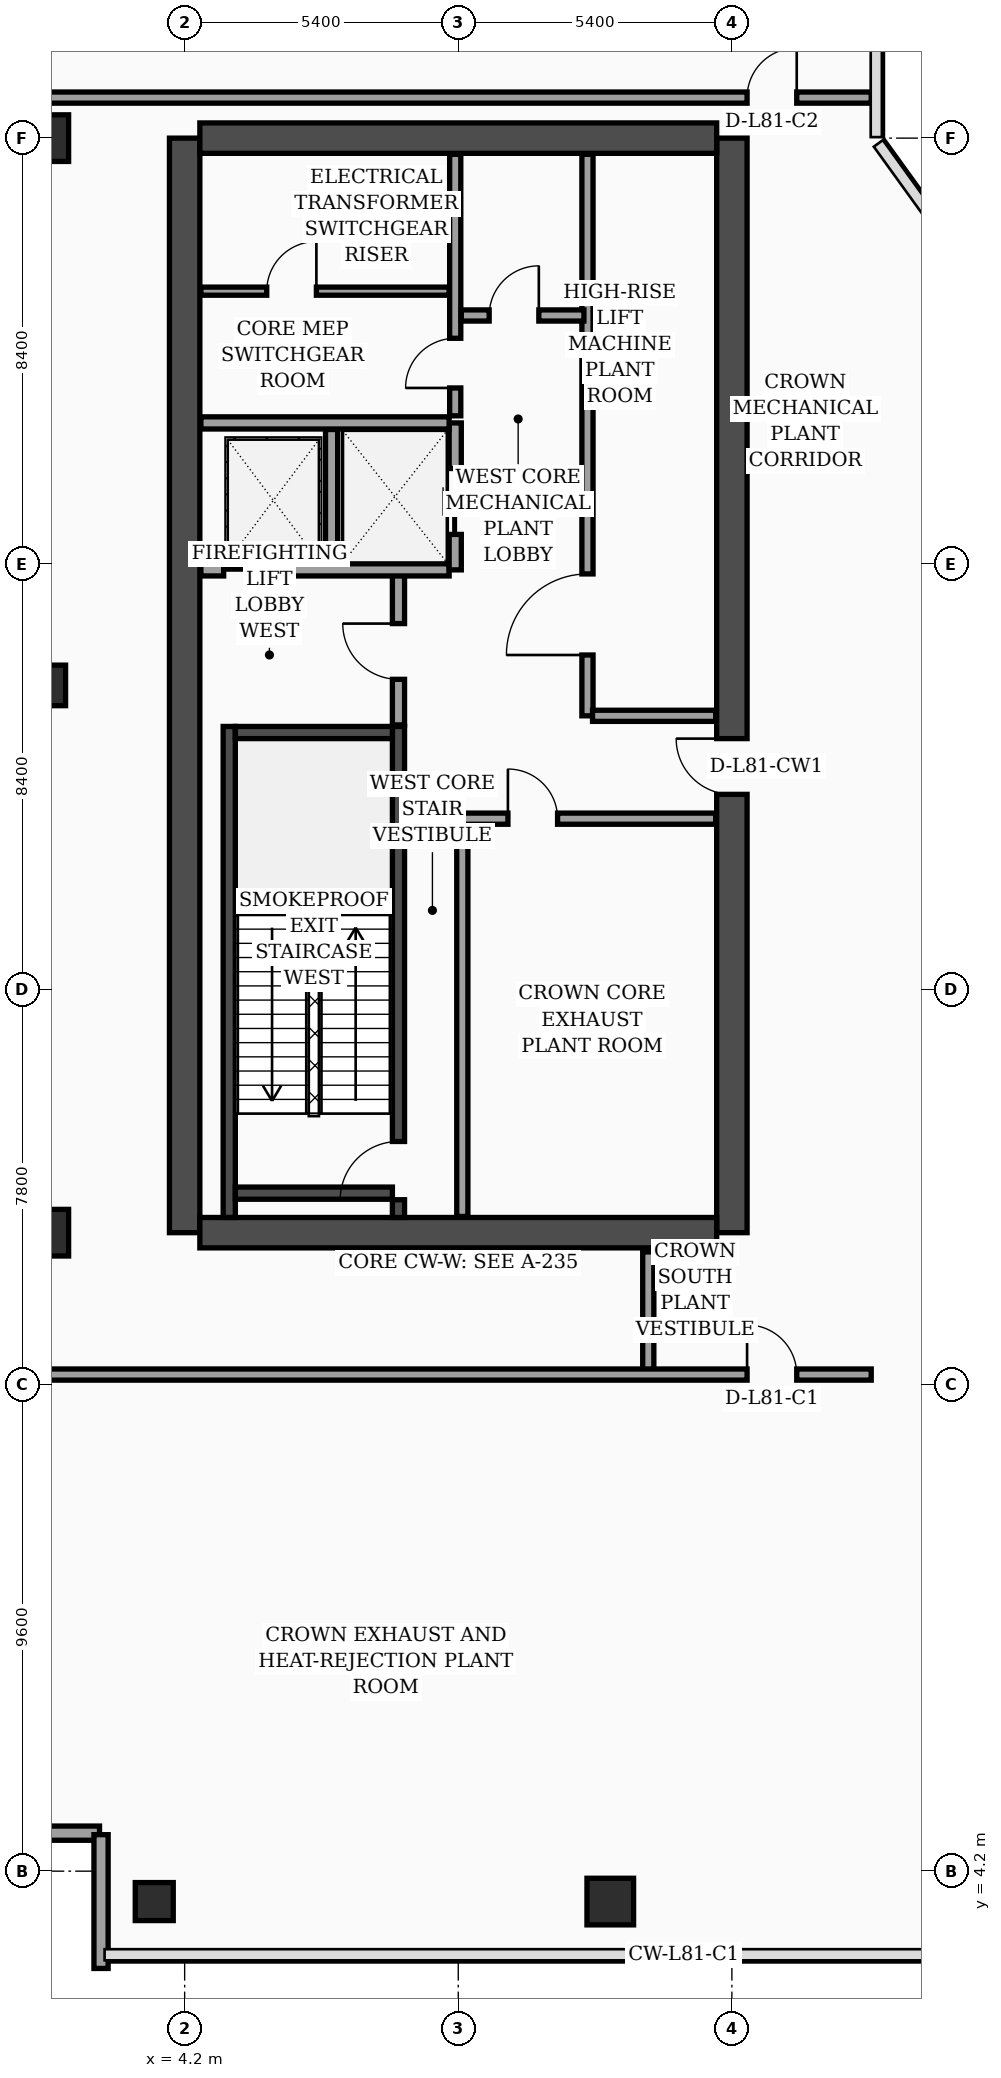
"""IFC4 building model, lengths in metres.
Left out: names, types, materials, properties, quantities, classifications, styles, units other than length and angle.
Written with IfcOpenShell. Run it as: python <this file> out.ifc"""

import sys

from ifc_helpers import new_model, si_unit, direction, frame, frame_2d, origin, origin_2d, place, context, subcontext, project, spatial, rectangle, hollow_rectangle, extrude, element, fill, save


model = new_model("IFC4")
c1 = context("Model", 3, precision=1e-05, world=origin(), true_north=direction((0.0, 1.0)))
c2 = subcontext(c1, "Body", "Model", "MODEL_VIEW")
j1 = project(units=[si_unit("LENGTHUNIT", "METRE"), si_unit("PLANEANGLEUNIT", "RADIAN")], contexts=[c1])
p1 = place(None, origin())
s1 = spatial("IfcSite", under=j1, at=p1, CompositionType="ELEMENT")
p2 = place(p1, origin())
s2 = spatial("IfcBuilding", under=s1, at=p2, CompositionType="ELEMENT")
p3 = place(p2, frame((0.0, 0.0, 330.5)))
s3 = spatial("IfcBuildingStorey", under=s2, at=p3, CompositionType="ELEMENT", Elevation=330.5)
p4 = place(p3, frame((4.2, 16.8, 0.0), z_axis=(0.0, 0.0, 1.0), x_axis=(0.0, 1.0, 0.0)))
e1 = element("IfcWall", 1, at=p4, inside=s3, PredefinedType="SHEAR", context=c2, shape_type="SweptSolid", body=[
    extrude(rectangle(XDim=21.6, YDim=0.6, at=frame_2d((10.8, 0.0))), origin(), (0.0, 0.0, 1.0), 4.76),
])
p5 = place(p3, frame((15.0, 16.8, 0.0), z_axis=(0.0, 0.0, 1.0), x_axis=(0.0, 1.0, 0.0)))
e2 = element("IfcWall", 2, at=p5, inside=s3, PredefinedType="SHEAR", context=c2, shape_type="SweptSolid", body=[
    extrude(rectangle(XDim=21.6, YDim=0.6, at=frame_2d((10.8, 0.0))), origin(), (0.0, 0.0, 1.0), 4.76),
])
p6 = place(p5, frame((8.65, 0.0, 0.0)))
e3 = element("IfcOpeningElement", 3, at=p6, cuts=e2, PredefinedType="OPENING", context=c2, shape_type="SweptSolid", body=[
    extrude(rectangle(XDim=1.1, YDim=2.2, at=frame_2d((0.55, 1.1))), frame((0.0, 0.31, 0.0), z_axis=(0.0, -1.0, 0.0), x_axis=(1.0, 0.0, 0.0)), (0.0, 0.0, 1.0), 0.62),
])
for number, where, z_axis, x_axis in (
    (4, (4.5, 38.4, 0.0), (0.0, 0.0, 1.0), (1.0, 0.0, 0.0)),
    (5, (4.5, 16.8, 0.0), (0.0, 0.0, 1.0), (1.0, 0.0, 0.0)),
):
    element("IfcWall", number, at=place(p3, frame(where, z_axis=z_axis, x_axis=x_axis)), inside=s3, PredefinedType="SHEAR", context=c2, shape_type="SweptSolid", body=[
        extrude(rectangle(XDim=10.2, YDim=0.6, at=frame_2d((5.1, 0.0))), origin(), (0.0, 0.0, 1.0), 4.76),
    ])
p7 = place(p3, frame((5.08, 17.1, 0.0), z_axis=(0.0, 0.0, 1.0), x_axis=(0.0, 1.0, 0.0)))
e6 = element("IfcWall", 6, at=p7, inside=s3, PredefinedType="SOLIDWALL", context=c2, shape_type="SweptSolid", body=[
    extrude(rectangle(XDim=9.69, YDim=0.24, at=frame_2d((4.845, 0.0))), origin(), (0.0, 0.0, 1.0), 4.76),
])
p8 = place(p3, frame((8.42, 17.1, 0.0), z_axis=(0.0, 0.0, 1.0), x_axis=(0.0, 1.0, 0.0)))
e7 = element("IfcWall", 7, at=p8, inside=s3, PredefinedType="SOLIDWALL", context=c2, shape_type="SweptSolid", body=[
    extrude(rectangle(XDim=9.69, YDim=0.24, at=frame_2d((4.845, 0.0))), origin(), (0.0, 0.0, 1.0), 4.76),
])
p9 = place(p8, frame((0.35, 0.0, 0.0)))
e8 = element("IfcOpeningElement", 8, at=p9, cuts=e7, PredefinedType="OPENING", context=c2, shape_type="SweptSolid", body=[
    extrude(rectangle(XDim=1.15, YDim=2.2, at=frame_2d((0.575, 1.1))), frame((0.0, 0.13, 0.0), z_axis=(0.0, -1.0, 0.0), x_axis=(1.0, 0.0, 0.0)), (0.0, 0.0, 1.0), 0.26),
])
for number, where, z_axis, x_axis in (
    (9, (5.2, 17.58, 0.0), (0.0, 0.0, 1.0), (1.0, 0.0, 0.0)),
    (10, (5.2, 26.67, 0.0), (0.0, 0.0, 1.0), (1.0, 0.0, 0.0)),
):
    element("IfcWall", number, at=place(p3, frame(where, z_axis=z_axis, x_axis=x_axis)), inside=s3, PredefinedType="SOLIDWALL", context=c2, shape_type="SweptSolid", body=[
        extrude(rectangle(XDim=3.1, YDim=0.24, at=frame_2d((1.55, 0.0))), origin(), (0.0, 0.0, 1.0), 4.76),
    ])
p10 = place(p3, frame((3.6, 3.6, 0.0), z_axis=(0.0, 0.0, 1.0), x_axis=(1.0, 0.0, 0.0)))
e11 = element("IfcColumn", 11, at=p10, inside=s3, PredefinedType="COLUMN", context=c2, shape_type="SweptSolid", body=[
    extrude(hollow_rectangle(XDim=0.75, YDim=0.75, WallThickness=0.032, at=origin_2d()), origin(), (0.0, 0.0, 1.0), 4.76),
])
p11 = place(p3, frame((1.45, 16.8, 0.0), z_axis=(0.0, 0.0, 1.0), x_axis=(1.0, 0.0, 0.0)))
e12 = element("IfcColumn", 12, at=p11, inside=s3, PredefinedType="COLUMN", context=c2, shape_type="SweptSolid", body=[
    extrude(rectangle(XDim=0.92, YDim=0.92, at=origin_2d()), origin(), (0.0, 0.0, 1.0), 4.76),
])
p12 = place(p3, frame((1.45, 27.6, 0.0), z_axis=(0.0, 0.0, 1.0), x_axis=(1.0, 0.0, 0.0)))
e13 = element("IfcColumn", 13, at=p12, inside=s3, PredefinedType="COLUMN", context=c2, shape_type="SweptSolid", body=[
    extrude(rectangle(XDim=0.8, YDim=0.8, at=origin_2d()), origin(), (0.0, 0.0, 1.0), 4.76),
])
for number, where, z_axis, x_axis in (
    (14, (1.45, 38.4, 0.0), (0.0, 0.0, 1.0), (1.0, 0.0, 0.0)),
    (15, (12.6, 3.6, 0.0), (0.0, 0.0, 1.0), (1.0, 0.0, 0.0)),
):
    element("IfcColumn", number, at=place(p3, frame(where, z_axis=z_axis, x_axis=x_axis)), inside=s3, PredefinedType="COLUMN", context=c2, shape_type="SweptSolid", body=[
        extrude(rectangle(XDim=0.92, YDim=0.92, at=origin_2d()), origin(), (0.0, 0.0, 1.0), 4.76),
    ])
p13 = place(p3, frame((-0.12, 4.95, 0.0), z_axis=(0.0, 0.0, 1.0), x_axis=(1.0, 0.0, 0.0)))
e16 = element("IfcWall", 16, at=p13, inside=s3, PredefinedType="SOLIDWALL", context=c2, shape_type="SweptSolid", body=[
    extrude(rectangle(XDim=2.64, YDim=0.28, at=frame_2d((1.32, 0.0))), origin(), (0.0, 0.0, 1.0), 4.76),
])
p14 = place(p3, frame((2.55, 4.92, 0.0), z_axis=(0.0, 0.0, 1.0), x_axis=(0.0, -1.0, 0.0)))
e17 = element("IfcWall", 17, at=p14, inside=s3, PredefinedType="SOLIDWALL", context=c2, shape_type="SweptSolid", body=[
    extrude(rectangle(XDim=2.64, YDim=0.28, at=frame_2d((1.32, 0.0))), origin(), (0.0, 0.0, 1.0), 4.76),
])
p15 = place(p3, frame((8.42, 26.82, 0.0), z_axis=(0.0, 0.0, 1.0), x_axis=(0.0, 1.0, 0.0)))
e18 = element("IfcWall", 18, at=p15, inside=s3, PredefinedType="SOLIDWALL", context=c2, shape_type="SweptSolid", body=[
    extrude(rectangle(XDim=3.0, YDim=0.24, at=frame_2d((1.5, 0.0))), origin(), (0.0, 0.0, 1.0), 4.76),
])
p16 = place(p15, frame((0.9, 0.0, 0.0)))
e19 = element("IfcOpeningElement", 19, at=p16, cuts=e18, PredefinedType="OPENING", context=c2, shape_type="SweptSolid", body=[
    extrude(rectangle(XDim=1.1, YDim=2.2, at=frame_2d((0.55, 1.1))), frame((0.0, 0.13, 0.0), z_axis=(0.0, -1.0, 0.0), x_axis=(1.0, 0.0, 0.0)), (0.0, 0.0, 1.0), 0.26),
])
p17 = place(p3, frame((4.52, 29.88, 0.0), z_axis=(0.0, 0.0, 1.0), x_axis=(1.0, 0.0, 0.0)))
e20 = element("IfcWall", 20, at=p17, inside=s3, PredefinedType="SOLIDWALL", context=c2, shape_type="SweptSolid", body=[
    extrude(rectangle(XDim=4.9, YDim=0.24, at=frame_2d((2.45, 0.0))), origin(), (0.0, 0.0, 1.0), 4.76),
])
p18 = place(p17, frame((0.45, 0.0, 0.0)))
e21 = element("IfcOpeningElement", 21, at=p18, cuts=e20, PredefinedType="OPENING", context=c2, shape_type="SweptSolid", body=[
    extrude(rectangle(XDim=1.3, YDim=2.35, at=frame_2d((0.65, 1.175))), frame((0.0, 0.13, 0.0), z_axis=(0.0, -1.0, 0.0), x_axis=(1.0, 0.0, 0.0)), (0.0, 0.0, 1.0), 0.26),
])
p19 = place(p3, frame((7.1, 30.02, 0.0), z_axis=(0.0, 0.0, 1.0), x_axis=(0.0, 1.0, 0.0)))
e22 = element("IfcWall", 22, at=p19, inside=s3, PredefinedType="SOLIDWALL", context=c2, shape_type="SweptSolid", body=[
    extrude(rectangle(XDim=2.63, YDim=0.24, at=frame_2d((1.315, 0.0))), origin(), (0.0, 0.0, 1.0), 4.76),
])
p20 = place(p3, frame((9.54, 29.88, 0.0), z_axis=(0.0, 0.0, 1.0), x_axis=(0.0, 1.0, 0.0)))
e23 = element("IfcWall", 23, at=p20, inside=s3, PredefinedType="SOLIDWALL", context=c2, shape_type="SweptSolid", body=[
    extrude(rectangle(XDim=2.9, YDim=0.24, at=frame_2d((1.45, 0.0))), origin(), (0.0, 0.0, 1.0), 4.76),
])
p21 = place(p20, frame((0.7, 0.0, 0.0)))
e24 = element("IfcOpeningElement", 24, at=p21, cuts=e23, PredefinedType="OPENING", context=c2, shape_type="SweptSolid", body=[
    extrude(rectangle(XDim=1.3, YDim=2.35, at=frame_2d((0.65, 1.175))), frame((0.0, 0.13, 0.0), z_axis=(0.0, -1.0, 0.0), x_axis=(1.0, 0.0, 0.0)), (0.0, 0.0, 1.0), 0.26),
])
p22 = place(p3, frame((4.52, 32.78, 0.0), z_axis=(0.0, 0.0, 1.0), x_axis=(1.0, 0.0, 0.0)))
e25 = element("IfcWall", 25, at=p22, inside=s3, PredefinedType="SOLIDWALL", context=c2, shape_type="SweptSolid", body=[
    extrude(rectangle(XDim=4.9, YDim=0.24, at=frame_2d((2.45, 0.0))), origin(), (0.0, 0.0, 1.0), 4.76),
])
p23 = place(p3, frame((9.68, 17.12, 0.0), z_axis=(0.0, 0.0, 1.0), x_axis=(0.0, 1.0, 0.0)))
e26 = element("IfcWall", 26, at=p23, inside=s3, PredefinedType="SOLIDWALL", context=c2, shape_type="SweptSolid", body=[
    extrude(rectangle(XDim=7.88, YDim=0.22, at=frame_2d((3.94, 0.0))), origin(), (0.0, 0.0, 1.0), 4.76),
])
p24 = place(p3, frame((4.52, 35.38, 0.0), z_axis=(0.0, 0.0, 1.0), x_axis=(1.0, 0.0, 0.0)))
e27 = element("IfcWall", 27, at=p24, inside=s3, PredefinedType="PARTITIONING", context=c2, shape_type="SweptSolid", body=[
    extrude(rectangle(XDim=4.9, YDim=0.16, at=frame_2d((2.45, 0.0))), origin(), (0.0, 0.0, 1.0), 4.76),
])
p25 = place(p24, frame((1.3, 0.0, 0.0)))
e28 = element("IfcOpeningElement", 28, at=p25, cuts=e27, PredefinedType="OPENING", context=c2, shape_type="SweptSolid", body=[
    extrude(rectangle(XDim=0.98, YDim=2.15, at=frame_2d((0.49, 1.075))), frame((0.0, 0.09, 0.0), z_axis=(0.0, -1.0, 0.0), x_axis=(1.0, 0.0, 0.0)), (0.0, 0.0, 1.0), 0.18),
])
p26 = place(p3, frame((9.54, 32.92, 0.0), z_axis=(0.0, 0.0, 1.0), x_axis=(0.0, 1.0, 0.0)))
e29 = element("IfcWall", 29, at=p26, inside=s3, PredefinedType="SOLIDWALL", context=c2, shape_type="SweptSolid", body=[
    extrude(rectangle(XDim=5.16, YDim=0.22, at=frame_2d((2.58, 0.0))), origin(), (0.0, 0.0, 1.0), 4.76),
])
p27 = place(p26, frame((0.55, 0.0, 0.0)))
e30 = element("IfcOpeningElement", 30, at=p27, cuts=e29, PredefinedType="OPENING", context=c2, shape_type="SweptSolid", body=[
    extrude(rectangle(XDim=0.98, YDim=2.15, at=frame_2d((0.49, 1.075))), frame((0.0, 0.12, 0.0), z_axis=(0.0, -1.0, 0.0), x_axis=(1.0, 0.0, 0.0)), (0.0, 0.0, 1.0), 0.24),
])
p28 = place(p3, frame((9.68, 24.97, 0.0), z_axis=(0.0, 0.0, 1.0), x_axis=(1.0, 0.0, 0.0)))
e31 = element("IfcWall", 31, at=p28, inside=s3, PredefinedType="SOLIDWALL", context=c2, shape_type="SweptSolid", body=[
    extrude(rectangle(XDim=5.0, YDim=0.22, at=frame_2d((2.5, 0.0))), origin(), (0.0, 0.0, 1.0), 4.76),
])
p29 = place(p28, frame((0.9, 0.0, 0.0)))
e32 = element("IfcOpeningElement", 32, at=p29, cuts=e31, PredefinedType="OPENING", context=c2, shape_type="SweptSolid", body=[
    extrude(rectangle(XDim=0.98, YDim=2.15, at=frame_2d((0.49, 1.075))), frame((0.0, 0.12, 0.0), z_axis=(0.0, -1.0, 0.0), x_axis=(1.0, 0.0, 0.0)), (0.0, 0.0, 1.0), 0.24),
])
p30 = place(p3, frame((12.15, 27.0, 0.0), z_axis=(0.0, 0.0, 1.0), x_axis=(0.0, 1.0, 0.0)))
e33 = element("IfcWall", 33, at=p30, inside=s3, PredefinedType="SOLIDWALL", context=c2, shape_type="SweptSolid", body=[
    extrude(rectangle(XDim=11.08, YDim=0.22, at=frame_2d((5.54, 0.0))), origin(), (0.0, 0.0, 1.0), 4.76),
])
p31 = place(p30, frame((1.2, 0.0, 0.0)))
e34 = element("IfcOpeningElement", 34, at=p31, cuts=e33, PredefinedType="OPENING", context=c2, shape_type="SweptSolid", body=[
    extrude(rectangle(XDim=1.6, YDim=2.35, at=frame_2d((0.8, 1.175))), frame((0.0, 0.12, 0.0), z_axis=(0.0, -1.0, 0.0), x_axis=(1.0, 0.0, 0.0)), (0.0, 0.0, 1.0), 0.24),
])
p32 = place(p3, frame((12.25, 27.0, 0.0), z_axis=(0.0, 0.0, 1.0), x_axis=(1.0, 0.0, 0.0)))
e35 = element("IfcWall", 35, at=p32, inside=s3, PredefinedType="SOLIDWALL", context=c2, shape_type="SweptSolid", body=[
    extrude(rectangle(XDim=2.43, YDim=0.22, at=frame_2d((1.215, 0.0))), origin(), (0.0, 0.0, 1.0), 4.76),
])
p33 = place(p3, frame((9.66, 34.9, 0.0), z_axis=(0.0, 0.0, 1.0), x_axis=(1.0, 0.0, 0.0)))
e36 = element("IfcWall", 36, at=p33, inside=s3, PredefinedType="SOLIDWALL", context=c2, shape_type="SweptSolid", body=[
    extrude(rectangle(XDim=2.42, YDim=0.22, at=frame_2d((1.21, 0.0))), origin(), (0.0, 0.0, 1.0), 4.76),
])
p34 = place(p33, frame((0.55, 0.0, 0.0)))
e37 = element("IfcOpeningElement", 37, at=p34, cuts=e36, PredefinedType="OPENING", context=c2, shape_type="SweptSolid", body=[
    extrude(rectangle(XDim=0.98, YDim=2.15, at=frame_2d((0.49, 1.075))), frame((0.0, 0.12, 0.0), z_axis=(0.0, -1.0, 0.0), x_axis=(1.0, 0.0, 0.0)), (0.0, 0.0, 1.0), 0.24),
])
p35 = place(p3, frame((13.35, 14.0, 0.0), z_axis=(0.0, 0.0, 1.0), x_axis=(0.0, 1.0, 0.0)))
e38 = element("IfcWall", 38, at=p35, inside=s3, PredefinedType="SOLIDWALL", context=c2, shape_type="SweptSolid", body=[
    extrude(rectangle(XDim=2.42, YDim=0.22, at=frame_2d((1.21, 0.0))), origin(), (0.0, 0.0, 1.0), 4.76),
])
p36 = place(p3, frame((0.08, 14.0, 0.0), z_axis=(0.0, 0.0, 1.0), x_axis=(1.0, 0.0, 0.0)))
e39 = element("IfcWall", 39, at=p36, inside=s3, PredefinedType="SOLIDWALL", context=c2, shape_type="SweptSolid", body=[
    extrude(rectangle(XDim=17.67, YDim=0.22, at=frame_2d((8.835, 0.0))), origin(), (0.0, 0.0, 1.0), 4.19),
])
p37 = place(p36, frame((15.22, 0.0, 0.0)))
e40 = element("IfcOpeningElement", 40, at=p37, cuts=e39, PredefinedType="OPENING", context=c2, shape_type="SweptSolid", body=[
    extrude(rectangle(XDim=0.98, YDim=2.15, at=frame_2d((0.49, 1.075))), frame((0.0, 0.12, 0.0), z_axis=(0.0, -1.0, 0.0), x_axis=(1.0, 0.0, 0.0)), (0.0, 0.0, 1.0), 0.24),
])
p38 = place(p3, frame((0.08, 39.2, 0.0), z_axis=(0.0, 0.0, 1.0), x_axis=(1.0, 0.0, 0.0)))
e41 = element("IfcWall", 41, at=p38, inside=s3, PredefinedType="SOLIDWALL", context=c2, shape_type="SweptSolid", body=[
    extrude(rectangle(XDim=17.67, YDim=0.22, at=frame_2d((8.835, 0.0))), origin(), (0.0, 0.0, 1.0), 4.19),
])
p39 = place(p38, frame((15.22, 0.0, 0.0)))
e42 = element("IfcOpeningElement", 42, at=p39, cuts=e41, PredefinedType="OPENING", context=c2, shape_type="SweptSolid", body=[
    extrude(rectangle(XDim=0.98, YDim=2.15, at=frame_2d((0.49, 1.075))), frame((0.0, 0.12, 0.0), z_axis=(0.0, -1.0, 0.0), x_axis=(1.0, 0.0, 0.0)), (0.0, 0.0, 1.0), 0.24),
])
p40 = place(p16, origin())
e43 = element("IfcDoor", 43, at=p40, inside=s3, OperationType="SINGLE_SWING_RIGHT", PredefinedType="DOOR", context=c2, shape_type="SweptSolid", body=[
    extrude(rectangle(XDim=1.1, YDim=2.2, at=frame_2d((0.55, 1.1))), frame((0.0, 0.025, 0.0), z_axis=(0.0, -1.0, 0.0), x_axis=(1.0, 0.0, 0.0)), (0.0, 0.0, 1.0), 0.05),
])
fill(e19, e43)
p41 = place(p18, origin())
e44 = element("IfcDoor", 44, at=p41, inside=s3, OperationType="DOUBLE_DOOR_SLIDING", PredefinedType="DOOR", context=c2, shape_type="SweptSolid", body=[
    extrude(rectangle(XDim=1.3, YDim=2.35, at=frame_2d((0.65, 1.175))), frame((0.0, 0.025, 0.0), z_axis=(0.0, -1.0, 0.0), x_axis=(1.0, 0.0, 0.0)), (0.0, 0.0, 1.0), 0.05),
])
fill(e21, e44)
p42 = place(p21, origin())
e45 = element("IfcDoor", 45, at=p42, inside=s3, OperationType="DOUBLE_DOOR_SLIDING", PredefinedType="DOOR", context=c2, shape_type="SweptSolid", body=[
    extrude(rectangle(XDim=1.3, YDim=2.35, at=frame_2d((0.65, 1.175))), frame((0.0, 0.025, 0.0), z_axis=(0.0, -1.0, 0.0), x_axis=(1.0, 0.0, 0.0)), (0.0, 0.0, 1.0), 0.05),
])
fill(e24, e45)
p43 = place(p25, origin())
e46 = element("IfcDoor", 46, at=p43, inside=s3, OperationType="SINGLE_SWING_RIGHT", PredefinedType="DOOR", context=c2, shape_type="SweptSolid", body=[
    extrude(rectangle(XDim=0.98, YDim=2.15, at=frame_2d((0.49, 1.075))), frame((0.0, 0.025, 0.0), z_axis=(0.0, -1.0, 0.0), x_axis=(1.0, 0.0, 0.0)), (0.0, 0.0, 1.0), 0.05),
])
fill(e28, e46)
p44 = place(p27, origin())
e47 = element("IfcDoor", 47, at=p44, inside=s3, OperationType="SINGLE_SWING_LEFT", PredefinedType="DOOR", context=c2, shape_type="SweptSolid", body=[
    extrude(rectangle(XDim=0.98, YDim=2.15, at=frame_2d((0.49, 1.075))), frame((0.0, 0.025, 0.0), z_axis=(0.0, -1.0, 0.0), x_axis=(1.0, 0.0, 0.0)), (0.0, 0.0, 1.0), 0.05),
])
fill(e30, e47)
p45 = place(p29, origin())
e48 = element("IfcDoor", 48, at=p45, inside=s3, OperationType="SINGLE_SWING_LEFT", PredefinedType="DOOR", context=c2, shape_type="SweptSolid", body=[
    extrude(rectangle(XDim=0.98, YDim=2.15, at=frame_2d((0.49, 1.075))), frame((0.0, 0.025, 0.0), z_axis=(0.0, -1.0, 0.0), x_axis=(1.0, 0.0, 0.0)), (0.0, 0.0, 1.0), 0.05),
])
fill(e32, e48)
p46 = place(p31, origin())
e49 = element("IfcDoor", 49, at=p46, inside=s3, OperationType="SINGLE_SWING_LEFT", PredefinedType="DOOR", context=c2, shape_type="SweptSolid", body=[
    extrude(rectangle(XDim=1.6, YDim=2.35, at=frame_2d((0.8, 1.175))), frame((0.0, 0.025, 0.0), z_axis=(0.0, -1.0, 0.0), x_axis=(1.0, 0.0, 0.0)), (0.0, 0.0, 1.0), 0.05),
])
fill(e34, e49)
p47 = place(p34, origin())
e50 = element("IfcDoor", 50, at=p47, inside=s3, OperationType="SINGLE_SWING_RIGHT", PredefinedType="DOOR", context=c2, shape_type="SweptSolid", body=[
    extrude(rectangle(XDim=0.98, YDim=2.15, at=frame_2d((0.49, 1.075))), frame((0.0, 0.025, 0.0), z_axis=(0.0, -1.0, 0.0), x_axis=(1.0, 0.0, 0.0)), (0.0, 0.0, 1.0), 0.05),
])
fill(e37, e50)
p48 = place(p37, origin())
e51 = element("IfcDoor", 51, at=p48, inside=s3, OperationType="SINGLE_SWING_LEFT", PredefinedType="DOOR", context=c2, shape_type="SweptSolid", body=[
    extrude(rectangle(XDim=0.98, YDim=2.15, at=frame_2d((0.49, 1.075))), frame((0.0, 0.025, 0.0), z_axis=(0.0, -1.0, 0.0), x_axis=(1.0, 0.0, 0.0)), (0.0, 0.0, 1.0), 0.05),
])
fill(e40, e51)
p49 = place(p39, origin())
e52 = element("IfcDoor", 52, at=p49, inside=s3, OperationType="SINGLE_SWING_RIGHT", PredefinedType="DOOR", context=c2, shape_type="SweptSolid", body=[
    extrude(rectangle(XDim=0.98, YDim=2.15, at=frame_2d((0.49, 1.075))), frame((0.0, 0.025, 0.0), z_axis=(0.0, -1.0, 0.0), x_axis=(1.0, 0.0, 0.0)), (0.0, 0.0, 1.0), 0.05),
])
fill(e42, e52)
p50 = place(p9, origin())
e53 = element("IfcDoor", 53, at=p50, inside=s3, OperationType="SINGLE_SWING_LEFT", PredefinedType="DOOR", context=c2, shape_type="SweptSolid", body=[
    extrude(rectangle(XDim=1.15, YDim=2.2, at=frame_2d((0.575, 1.1))), frame((0.0, 0.025, 0.0), z_axis=(0.0, -1.0, 0.0), x_axis=(1.0, 0.0, 0.0)), (0.0, 0.0, 1.0), 0.05),
])
fill(e8, e53)
p51 = place(p6, origin())
e54 = element("IfcDoor", 54, at=p51, inside=s3, OperationType="SINGLE_SWING_RIGHT", PredefinedType="DOOR", context=c2, shape_type="SweptSolid", body=[
    extrude(rectangle(XDim=1.1, YDim=2.2, at=frame_2d((0.55, 1.1))), frame((0.0, 0.025, 0.0), z_axis=(0.0, -1.0, 0.0), x_axis=(1.0, 0.0, 0.0)), (0.0, 0.0, 1.0), 0.05),
])
fill(e3, e54)
save(model, sys.argv[1])
